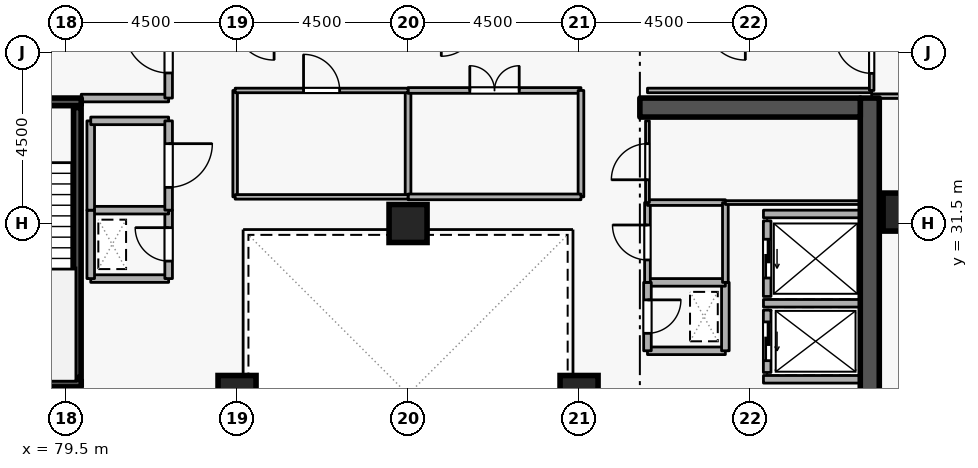
"""IFC4 building model, lengths in metres.
Left out: names, types, materials, properties, quantities, classifications, styles, units other than length and angle.
Written with IfcOpenShell. Run it as: python <this file> out.ifc"""

import sys

from ifc_helpers import new_model, si_unit, direction, frame, frame_2d, origin, origin_2d, place, context, subcontext, project, spatial, rectangle, extrude, element, fill, save


model = new_model("IFC4")
c1 = context("Model", 3, precision=1e-05, world=origin(), true_north=direction((0.0, 1.0)))
c2 = subcontext(c1, "Body", "Model", "MODEL_VIEW")
j1 = project(units=[si_unit("LENGTHUNIT", "METRE"), si_unit("PLANEANGLEUNIT", "RADIAN")], contexts=[c1])
p1 = place(None, origin())
s1 = spatial("IfcSite", under=j1, at=p1, CompositionType="ELEMENT")
p2 = place(p1, origin())
s2 = spatial("IfcBuilding", under=s1, at=p2, CompositionType="ELEMENT")
p3 = place(p2, frame((0.0, 0.0, 240.3)))
s3 = spatial("IfcBuildingStorey", under=s2, at=p3, CompositionType="ELEMENT", Elevation=240.3)
p4 = place(p3, frame((100.65, 19.2, 0.0), z_axis=(0.0, 0.0, 1.0), x_axis=(0.0, 1.0, 0.0)))
e1 = element("IfcWall", 1, at=p4, inside=s3, PredefinedType="SHEAR", context=c2, shape_type="SweptSolid", body=[
    extrude(rectangle(XDim=15.6, YDim=0.5, at=frame_2d((7.8, 0.0))), origin(), (0.0, 0.0, 1.0), 3.6),
])
p5 = place(p3, frame((94.6, 34.55, 0.0), z_axis=(0.0, 0.0, 1.0), x_axis=(1.0, 0.0, 0.0)))
e2 = element("IfcWall", 2, at=p5, inside=s3, PredefinedType="SHEAR", context=c2, shape_type="SweptSolid", body=[
    extrude(rectangle(XDim=5.8, YDim=0.5, at=frame_2d((2.9, 0.0))), origin(), (0.0, 0.0, 1.0), 3.6),
])
for number, where, z_axis, x_axis in (
    (3, (101.5, 31.8, 0.0), (0.0, 0.0, 1.0), (1.0, 0.0, 0.0)),
    (4, (93.0, 27.0, 0.0), (0.0, 0.0, 1.0), (1.0, 0.0, 0.0)),
    (5, (84.0, 27.0, 0.0), (0.0, 0.0, 1.0), (1.0, 0.0, 0.0)),
    (6, (88.5, 31.5, 0.0), (0.0, 0.0, 1.0), (1.0, 0.0, 0.0)),
):
    element("IfcColumn", number, at=place(p3, frame(where, z_axis=z_axis, x_axis=x_axis)), inside=s3, PredefinedType="COLUMN", context=c2, shape_type="SweptSolid", body=[
        extrude(rectangle(XDim=1.0, YDim=1.0, at=origin_2d()), origin(), (0.0, 0.0, 1.0), 3.6),
    ])
p6 = place(p3, frame((97.95, 29.22, 0.0), z_axis=(0.0, 0.0, 1.0), x_axis=(0.0, -1.0, 0.0)))
e7 = element("IfcWall", 7, at=p6, inside=s3, PredefinedType="STANDARD", context=c2, shape_type="SweptSolid", body=[
    extrude(rectangle(XDim=1.64, YDim=0.2, at=frame_2d((0.82, 0.0))), origin(), (0.0, 0.0, 1.0), 3.34),
])
p7 = place(p6, frame((0.31, 0.0, 0.0)))
e8 = element("IfcOpeningElement", 8, at=p7, cuts=e7, PredefinedType="OPENING", context=c2, shape_type="SweptSolid", body=[
    extrude(rectangle(XDim=1.02, YDim=2.06, at=frame_2d((0.51, 1.03))), frame((0.0, 0.11, 0.0), z_axis=(0.0, -1.0, 0.0), x_axis=(1.0, 0.0, 0.0)), (0.0, 0.0, 1.0), 0.22),
])
p8 = place(p3, frame((97.95, 31.57, 0.0), z_axis=(0.0, 0.0, 1.0), x_axis=(0.0, -1.0, 0.0)))
e9 = element("IfcWall", 9, at=p8, inside=s3, PredefinedType="STANDARD", context=c2, shape_type="SweptSolid", body=[
    extrude(rectangle(XDim=1.99, YDim=0.2, at=frame_2d((0.995, 0.0))), origin(), (0.0, 0.0, 1.0), 3.34),
])
p9 = place(p8, frame((0.485, 0.0, 0.0)))
e10 = element("IfcOpeningElement", 10, at=p9, cuts=e9, PredefinedType="OPENING", context=c2, shape_type="SweptSolid", body=[
    extrude(rectangle(XDim=1.02, YDim=2.06, at=frame_2d((0.51, 1.03))), frame((0.0, 0.11, 0.0), z_axis=(0.0, -1.0, 0.0), x_axis=(1.0, 0.0, 0.0)), (0.0, 0.0, 1.0), 0.22),
])
for number, where, z_axis, x_axis in (
    (11, (97.852, 29.4, 0.0), (0.0, 0.0, 1.0), (1.0, 0.0, 0.0)),
    (12, (97.852, 27.4, 0.0), (0.0, 0.0, 1.0), (1.0, 0.0, 0.0)),
    (13, (97.852, 31.75, 0.0), (0.0, 0.0, 1.0), (1.0, 0.0, 0.0)),
):
    element("IfcWall", number, at=place(p3, frame(where, z_axis=z_axis, x_axis=x_axis)), inside=s3, PredefinedType="STANDARD", context=c2, shape_type="SweptSolid", body=[
        extrude(rectangle(XDim=2.536, YDim=0.2, at=frame_2d((1.268, 0.0))), origin(), (0.0, 0.0, 1.0), 3.34),
    ])
p10 = place(p3, frame((76.55, 34.7, 0.0), z_axis=(0.0, 0.0, 1.0), x_axis=(1.0, 0.0, 0.0)))
e14 = element("IfcWall", 14, at=p10, inside=s3, PredefinedType="SHEAR", context=c2, shape_type="SweptSolid", body=[
    extrude(rectangle(XDim=3.35, YDim=0.2, at=frame_2d((1.675, 0.0))), origin(), (0.0, 0.0, 1.0), 3.6),
])
p11 = place(p10, frame((1.125, 0.0, 0.0)))
e15 = element("IfcOpeningElement", 15, at=p11, cuts=e14, PredefinedType="OPENING", context=c2, shape_type="SweptSolid", body=[
    extrude(rectangle(XDim=1.1, YDim=2.1, at=frame_2d((0.55, 1.05))), frame((0.0, 0.11, 0.0), z_axis=(0.0, -1.0, 0.0), x_axis=(1.0, 0.0, 0.0)), (0.0, 0.0, 1.0), 0.22),
])
p12 = place(p3, frame((79.9, 27.3, 0.0), z_axis=(0.0, 0.0, 1.0), x_axis=(-1.0, 0.0, 0.0)))
e16 = element("IfcWall", 16, at=p12, inside=s3, PredefinedType="SHEAR", context=c2, shape_type="SweptSolid", body=[
    extrude(rectangle(XDim=3.35, YDim=0.2, at=frame_2d((1.675, 0.0))), origin(), (0.0, 0.0, 1.0), 3.6),
])
p13 = place(p3, frame((79.797, 27.45, 0.0), z_axis=(0.0, 0.0, 1.0), x_axis=(0.0, 1.0, 0.0)))
e17 = element("IfcWall", 17, at=p13, inside=s3, PredefinedType="SHEAR", context=c2, shape_type="SweptSolid", body=[
    extrude(rectangle(XDim=7.1, YDim=0.2, at=frame_2d((3.55, 0.0))), origin(), (0.0, 0.0, 1.0), 3.6),
])
p14 = place(p3, frame((79.9, 34.8, 0.0), z_axis=(0.0, 0.0, 1.0), x_axis=(1.0, 0.0, 0.0)))
e18 = element("IfcWall", 18, at=p14, inside=s3, PredefinedType="STANDARD", context=c2, shape_type="SweptSolid", body=[
    extrude(rectangle(XDim=2.3, YDim=0.2, at=frame_2d((1.15, 0.0))), origin(), (0.0, 0.0, 1.0), 2.545),
])
p15 = place(p3, frame((82.2, 34.8, 0.0), z_axis=(0.0, 0.0, 1.0), x_axis=(0.0, 1.0, 0.0)))
e19 = element("IfcWall", 19, at=p15, inside=s3, PredefinedType="STANDARD", context=c2, shape_type="SweptSolid", body=[
    extrude(rectangle(XDim=2.5, YDim=0.2, at=frame_2d((1.25, 0.0))), origin(), (0.0, 0.0, 1.0), 3.34),
])
p16 = place(p15, frame((0.66, 0.0, 0.0)))
e20 = element("IfcOpeningElement", 20, at=p16, cuts=e19, PredefinedType="OPENING", context=c2, shape_type="SweptSolid", body=[
    extrude(rectangle(XDim=1.15, YDim=2.1, at=frame_2d((0.575, 1.05))), frame((0.0, 0.11, 0.0), z_axis=(0.0, -1.0, 0.0), x_axis=(1.0, 0.0, 0.0)), (0.0, 0.0, 1.0), 0.22),
])
p17 = place(p3, frame((94.8, 28.15, 0.0), z_axis=(0.0, 0.0, 1.0), x_axis=(1.0, 0.0, 0.0)))
e21 = element("IfcWall", 21, at=p17, inside=s3, PredefinedType="STANDARD", context=c2, shape_type="SweptSolid", body=[
    extrude(rectangle(XDim=2.05, YDim=0.2, at=frame_2d((1.025, 0.0))), origin(), (0.0, 0.0, 1.0), 3.34),
])
p18 = place(p3, frame((96.85, 28.15, 0.0), z_axis=(0.0, 0.0, 1.0), x_axis=(0.0, 1.0, 0.0)))
e22 = element("IfcWall", 22, at=p18, inside=s3, PredefinedType="STANDARD", context=c2, shape_type="SweptSolid", body=[
    extrude(rectangle(XDim=1.8, YDim=0.2, at=frame_2d((0.9, 0.0))), origin(), (0.0, 0.0, 1.0), 3.34),
])
p19 = place(p3, frame((96.85, 29.95, 0.0), z_axis=(0.0, 0.0, 1.0), x_axis=(-1.0, 0.0, 0.0)))
e23 = element("IfcWall", 23, at=p19, inside=s3, PredefinedType="STANDARD", context=c2, shape_type="SweptSolid", body=[
    extrude(rectangle(XDim=2.05, YDim=0.2, at=frame_2d((1.025, 0.0))), origin(), (0.0, 0.0, 1.0), 3.34),
])
p20 = place(p3, frame((94.8, 29.95, 0.0), z_axis=(0.0, 0.0, 1.0), x_axis=(0.0, -1.0, 0.0)))
e24 = element("IfcWall", 24, at=p20, inside=s3, PredefinedType="STANDARD", context=c2, shape_type="SweptSolid", body=[
    extrude(rectangle(XDim=1.8, YDim=0.2, at=frame_2d((0.9, 0.0))), origin(), (0.0, 0.0, 1.0), 3.34),
])
p21 = place(p20, frame((0.46, 0.0, 0.0)))
e25 = element("IfcOpeningElement", 25, at=p21, cuts=e24, PredefinedType="OPENING", context=c2, shape_type="SweptSolid", body=[
    extrude(rectangle(XDim=0.88, YDim=2.04, at=frame_2d((0.44, 1.02))), frame((0.0, 0.11, 0.0), z_axis=(0.0, -1.0, 0.0), x_axis=(1.0, 0.0, 0.0)), (0.0, 0.0, 1.0), 0.22),
])
p22 = place(p3, frame((80.15, 30.05, 0.0), z_axis=(0.0, 0.0, 1.0), x_axis=(1.0, 0.0, 0.0)))
e26 = element("IfcWall", 26, at=p22, inside=s3, PredefinedType="STANDARD", context=c2, shape_type="SweptSolid", body=[
    extrude(rectangle(XDim=2.05, YDim=0.2, at=frame_2d((1.025, 0.0))), origin(), (0.0, 0.0, 1.0), 3.34),
])
p23 = place(p3, frame((82.2, 30.05, 0.0), z_axis=(0.0, 0.0, 1.0), x_axis=(0.0, 1.0, 0.0)))
e27 = element("IfcWall", 27, at=p23, inside=s3, PredefinedType="STANDARD", context=c2, shape_type="SweptSolid", body=[
    extrude(rectangle(XDim=1.8, YDim=0.2, at=frame_2d((0.9, 0.0))), origin(), (0.0, 0.0, 1.0), 3.34),
])
p24 = place(p23, frame((0.46, 0.0, 0.0)))
e28 = element("IfcOpeningElement", 28, at=p24, cuts=e27, PredefinedType="OPENING", context=c2, shape_type="SweptSolid", body=[
    extrude(rectangle(XDim=0.88, YDim=2.04, at=frame_2d((0.44, 1.02))), frame((0.0, 0.11, 0.0), z_axis=(0.0, -1.0, 0.0), x_axis=(1.0, 0.0, 0.0)), (0.0, 0.0, 1.0), 0.22),
])
p25 = place(p3, frame((82.2, 31.85, 0.0), z_axis=(0.0, 0.0, 1.0), x_axis=(-1.0, 0.0, 0.0)))
e29 = element("IfcWall", 29, at=p25, inside=s3, PredefinedType="STANDARD", context=c2, shape_type="SweptSolid", body=[
    extrude(rectangle(XDim=2.05, YDim=0.2, at=frame_2d((1.025, 0.0))), origin(), (0.0, 0.0, 1.0), 3.34),
])
p26 = place(p3, frame((80.15, 31.85, 0.0), z_axis=(0.0, 0.0, 1.0), x_axis=(0.0, -1.0, 0.0)))
e30 = element("IfcWall", 30, at=p26, inside=s3, PredefinedType="STANDARD", context=c2, shape_type="SweptSolid", body=[
    extrude(rectangle(XDim=1.8, YDim=0.2, at=frame_2d((0.9, 0.0))), origin(), (0.0, 0.0, 1.0), 3.34),
])
p27 = place(p3, frame((80.15, 31.85, 0.0), z_axis=(0.0, 0.0, 1.0), x_axis=(0.0, 1.0, 0.0)))
e31 = element("IfcWall", 31, at=p27, inside=s3, PredefinedType="STANDARD", context=c2, shape_type="SweptSolid", body=[
    extrude(rectangle(XDim=2.35, YDim=0.2, at=frame_2d((1.175, 0.0))), origin(), (0.0, 0.0, 1.0), 3.34),
])
p28 = place(p3, frame((80.15, 34.2, 0.0), z_axis=(0.0, 0.0, 1.0), x_axis=(1.0, 0.0, 0.0)))
e32 = element("IfcWall", 32, at=p28, inside=s3, PredefinedType="STANDARD", context=c2, shape_type="SweptSolid", body=[
    extrude(rectangle(XDim=2.05, YDim=0.2, at=frame_2d((1.025, 0.0))), origin(), (0.0, 0.0, 1.0), 2.545),
])
p29 = place(p3, frame((82.2, 34.2, 0.0), z_axis=(0.0, 0.0, 1.0), x_axis=(0.0, -1.0, 0.0)))
e33 = element("IfcWall", 33, at=p29, inside=s3, PredefinedType="STANDARD", context=c2, shape_type="SweptSolid", body=[
    extrude(rectangle(XDim=2.35, YDim=0.2, at=frame_2d((1.175, 0.0))), origin(), (0.0, 0.0, 1.0), 3.34),
])
p30 = place(p29, frame((0.6, 0.0, 0.0)))
e34 = element("IfcOpeningElement", 34, at=p30, cuts=e33, PredefinedType="OPENING", context=c2, shape_type="SweptSolid", body=[
    extrude(rectangle(XDim=1.15, YDim=2.1, at=frame_2d((0.575, 1.05))), frame((0.0, 0.11, 0.0), z_axis=(0.0, -1.0, 0.0), x_axis=(1.0, 0.0, 0.0)), (0.0, 0.0, 1.0), 0.22),
])
p31 = place(p3, frame((94.8, 29.95, 0.0), z_axis=(0.0, 0.0, 1.0), x_axis=(0.0, 1.0, 0.0)))
e35 = element("IfcWall", 35, at=p31, inside=s3, PredefinedType="PARTITIONING", context=c2, shape_type="SweptSolid", body=[
    extrude(rectangle(XDim=2.1, YDim=0.15, at=frame_2d((1.05, 0.0))), origin(), (0.0, 0.0, 1.0), 3.34),
])
p32 = place(p31, frame((0.59, 0.0, 0.0)))
e36 = element("IfcOpeningElement", 36, at=p32, cuts=e35, PredefinedType="OPENING", context=c2, shape_type="SweptSolid", body=[
    extrude(rectangle(XDim=0.92, YDim=2.08, at=frame_2d((0.46, 1.04))), frame((0.0, 0.085, 0.0), z_axis=(0.0, -1.0, 0.0), x_axis=(1.0, 0.0, 0.0)), (0.0, 0.0, 1.0), 0.17),
])
p33 = place(p3, frame((94.8, 32.05, 0.0), z_axis=(0.0, 0.0, 1.0), x_axis=(1.0, 0.0, 0.0)))
e37 = element("IfcWall", 37, at=p33, inside=s3, PredefinedType="PARTITIONING", context=c2, shape_type="SweptSolid", body=[
    extrude(rectangle(XDim=2.05, YDim=0.15, at=frame_2d((1.025, 0.0))), origin(), (0.0, 0.0, 1.0), 3.34),
])
p34 = place(p3, frame((96.85, 32.05, 0.0), z_axis=(0.0, 0.0, 1.0), x_axis=(0.0, -1.0, 0.0)))
e38 = element("IfcWall", 38, at=p34, inside=s3, PredefinedType="PARTITIONING", context=c2, shape_type="SweptSolid", body=[
    extrude(rectangle(XDim=2.1, YDim=0.15, at=frame_2d((1.05, 0.0))), origin(), (0.0, 0.0, 1.0), 3.34),
])
p35 = place(p3, frame((94.8, 32.05, 0.0), z_axis=(0.0, 0.0, 1.0), x_axis=(0.0, 1.0, 0.0)))
e39 = element("IfcWall", 39, at=p35, inside=s3, PredefinedType="PARTITIONING", context=c2, shape_type="SweptSolid", body=[
    extrude(rectangle(XDim=2.15, YDim=0.1, at=frame_2d((1.075, 0.0))), origin(), (0.0, 0.0, 1.0), 3.34),
])
p36 = place(p35, frame((0.6, 0.0, 0.0)))
e40 = element("IfcOpeningElement", 40, at=p36, cuts=e39, PredefinedType="OPENING", context=c2, shape_type="SweptSolid", body=[
    extrude(rectangle(XDim=0.95, YDim=2.1, at=frame_2d((0.475, 1.05))), frame((0.0, 0.06, 0.0), z_axis=(0.0, -1.0, 0.0), x_axis=(1.0, 0.0, 0.0)), (0.0, 0.0, 1.0), 0.12),
])
p37 = place(p3, frame((100.4, 32.05, 0.0), z_axis=(0.0, 0.0, 1.0), x_axis=(-1.0, 0.0, 0.0)))
e41 = element("IfcWall", 41, at=p37, inside=s3, PredefinedType="PARTITIONING", context=c2, shape_type="SweptSolid", body=[
    extrude(rectangle(XDim=3.55, YDim=0.1, at=frame_2d((1.775, 0.0))), origin(), (0.0, 0.0, 1.0), 3.34),
])
p38 = place(p3, frame((94.8, 35.0, 0.0), z_axis=(0.0, 0.0, 1.0), x_axis=(1.0, 0.0, 0.0)))
e42 = element("IfcWall", 42, at=p38, inside=s3, PredefinedType="PARTITIONING", context=c2, shape_type="SweptSolid", body=[
    extrude(rectangle(XDim=5.9, YDim=0.12, at=frame_2d((2.95, 0.0))), origin(), (0.0, 0.0, 1.0), 3.34),
])
p39 = place(p3, frame((100.7, 35.0, 0.0), z_axis=(0.0, 0.0, 1.0), x_axis=(0.0, 1.0, 0.0)))
e43 = element("IfcWall", 43, at=p39, inside=s3, PredefinedType="PARTITIONING", context=c2, shape_type="SweptSolid", body=[
    extrude(rectangle(XDim=1.85, YDim=0.12, at=frame_2d((0.925, 0.0))), origin(), (0.0, 0.0, 1.0), 3.34),
])
p40 = place(p39, frame((0.45, 0.0, 0.0)))
e44 = element("IfcOpeningElement", 44, at=p40, cuts=e43, PredefinedType="OPENING", context=c2, shape_type="SweptSolid", body=[
    extrude(rectangle(XDim=0.95, YDim=2.1, at=frame_2d((0.475, 1.05))), frame((0.0, 0.07, 0.0), z_axis=(0.0, -1.0, 0.0), x_axis=(1.0, 0.0, 0.0)), (0.0, 0.0, 1.0), 0.14),
])
p41 = place(p3, frame((112.22, 34.85, 0.0), z_axis=(0.0, 0.0, 1.0), x_axis=(-1.0, 0.0, 0.0)))
e45 = element("IfcWall", 45, at=p41, inside=s3, PredefinedType="PARTITIONING", context=c2, shape_type="SweptSolid", body=[
    extrude(rectangle(XDim=11.52, YDim=0.12, at=frame_2d((5.76, 0.0))), origin(), (0.0, 0.0, 1.0), 3.34),
])
p42 = place(p3, frame((88.5, 32.2, 0.0), z_axis=(0.0, 0.0, 1.0), x_axis=(0.0, 1.0, 0.0)))
e46 = element("IfcWall", 46, at=p42, inside=s3, PredefinedType="PARTITIONING", context=c2, shape_type="SweptSolid", body=[
    extrude(rectangle(XDim=2.8, YDim=0.15, at=frame_2d((1.4, 0.0))), origin(), (0.0, 0.0, 1.0), 2.878),
])
p43 = place(p3, frame((88.5, 35.0, 0.0), z_axis=(0.0, 0.0, 1.0), x_axis=(1.0, 0.0, 0.0)))
e47 = element("IfcWall", 47, at=p43, inside=s3, PredefinedType="PARTITIONING", context=c2, shape_type="SweptSolid", body=[
    extrude(rectangle(XDim=4.55, YDim=0.15, at=frame_2d((2.275, 0.0))), origin(), (0.0, 0.0, 1.0), 3.34),
])
p44 = place(p43, frame((1.625, 0.0, 0.0)))
e48 = element("IfcOpeningElement", 48, at=p44, cuts=e47, PredefinedType="OPENING", context=c2, shape_type="SweptSolid", body=[
    extrude(rectangle(XDim=1.3, YDim=2.12, at=frame_2d((0.65, 1.06))), frame((0.0, 0.085, 0.0), z_axis=(0.0, -1.0, 0.0), x_axis=(1.0, 0.0, 0.0)), (0.0, 0.0, 1.0), 0.17),
])
p45 = place(p3, frame((93.05, 35.0, 0.0), z_axis=(0.0, 0.0, 1.0), x_axis=(0.0, -1.0, 0.0)))
e49 = element("IfcWall", 49, at=p45, inside=s3, PredefinedType="PARTITIONING", context=c2, shape_type="SweptSolid", body=[
    extrude(rectangle(XDim=2.8, YDim=0.15, at=frame_2d((1.4, 0.0))), origin(), (0.0, 0.0, 1.0), 3.34),
])
p46 = place(p3, frame((93.05, 32.2, 0.0), z_axis=(0.0, 0.0, 1.0), x_axis=(-1.0, 0.0, 0.0)))
e50 = element("IfcWall", 50, at=p46, inside=s3, PredefinedType="PARTITIONING", context=c2, shape_type="SweptSolid", body=[
    extrude(rectangle(XDim=4.55, YDim=0.15, at=frame_2d((2.275, 0.0))), origin(), (0.0, 0.0, 1.0), 3.34),
])
p47 = place(p3, frame((83.95, 32.2, 0.0), z_axis=(0.0, 0.0, 1.0), x_axis=(0.0, 1.0, 0.0)))
e51 = element("IfcWall", 51, at=p47, inside=s3, PredefinedType="PARTITIONING", context=c2, shape_type="SweptSolid", body=[
    extrude(rectangle(XDim=2.8, YDim=0.12, at=frame_2d((1.4, 0.0))), origin(), (0.0, 0.0, 1.0), 3.34),
])
p48 = place(p3, frame((83.95, 35.0, 0.0), z_axis=(0.0, 0.0, 1.0), x_axis=(1.0, 0.0, 0.0)))
e52 = element("IfcWall", 52, at=p48, inside=s3, PredefinedType="PARTITIONING", context=c2, shape_type="SweptSolid", body=[
    extrude(rectangle(XDim=4.55, YDim=0.12, at=frame_2d((2.275, 0.0))), origin(), (0.0, 0.0, 1.0), 3.34),
])
p49 = place(p48, frame((1.8, 0.0, 0.0)))
e53 = element("IfcOpeningElement", 53, at=p49, cuts=e52, PredefinedType="OPENING", context=c2, shape_type="SweptSolid", body=[
    extrude(rectangle(XDim=0.95, YDim=2.1, at=frame_2d((0.475, 1.05))), frame((0.0, 0.07, 0.0), z_axis=(0.0, -1.0, 0.0), x_axis=(1.0, 0.0, 0.0)), (0.0, 0.0, 1.0), 0.14),
])
p50 = place(p3, frame((88.5, 32.2, 0.0), z_axis=(0.0, 0.0, 1.0), x_axis=(-1.0, 0.0, 0.0)))
e54 = element("IfcWall", 54, at=p50, inside=s3, PredefinedType="PARTITIONING", context=c2, shape_type="SweptSolid", body=[
    extrude(rectangle(XDim=4.55, YDim=0.12, at=frame_2d((2.275, 0.0))), origin(), (0.0, 0.0, 1.0), 3.34),
])
p51 = place(p7, origin())
e55 = element("IfcDoor", 55, at=p51, inside=s3, OperationType="SLIDING_TO_LEFT", PredefinedType="DOOR", context=c2, shape_type="SweptSolid", body=[
    extrude(rectangle(XDim=1.02, YDim=2.06, at=frame_2d((0.51, 1.03))), frame((0.0, 0.025, 0.0), z_axis=(0.0, -1.0, 0.0), x_axis=(1.0, 0.0, 0.0)), (0.0, 0.0, 1.0), 0.05),
])
fill(e8, e55)
p52 = place(p9, origin())
e56 = element("IfcDoor", 56, at=p52, inside=s3, OperationType="SLIDING_TO_LEFT", PredefinedType="DOOR", context=c2, shape_type="SweptSolid", body=[
    extrude(rectangle(XDim=1.02, YDim=2.06, at=frame_2d((0.51, 1.03))), frame((0.0, 0.025, 0.0), z_axis=(0.0, -1.0, 0.0), x_axis=(1.0, 0.0, 0.0)), (0.0, 0.0, 1.0), 0.05),
])
fill(e10, e56)
p53 = place(p16, origin())
e57 = element("IfcDoor", 57, at=p53, inside=s3, OperationType="SINGLE_SWING_RIGHT", PredefinedType="DOOR", context=c2, shape_type="SweptSolid", body=[
    extrude(rectangle(XDim=1.15, YDim=2.1, at=frame_2d((0.575, 1.05))), frame((0.0, 0.025, 0.0), z_axis=(0.0, -1.0, 0.0), x_axis=(1.0, 0.0, 0.0)), (0.0, 0.0, 1.0), 0.05),
])
fill(e20, e57)
p54 = place(p21, origin())
e58 = element("IfcDoor", 58, at=p54, inside=s3, OperationType="SINGLE_SWING_LEFT", PredefinedType="DOOR", context=c2, shape_type="SweptSolid", body=[
    extrude(rectangle(XDim=0.88, YDim=2.04, at=frame_2d((0.44, 1.02))), frame((0.0, 0.025, 0.0), z_axis=(0.0, -1.0, 0.0), x_axis=(1.0, 0.0, 0.0)), (0.0, 0.0, 1.0), 0.05),
])
fill(e25, e58)
p55 = place(p24, origin())
e59 = element("IfcDoor", 59, at=p55, inside=s3, OperationType="SINGLE_SWING_RIGHT", PredefinedType="DOOR", context=c2, shape_type="SweptSolid", body=[
    extrude(rectangle(XDim=0.88, YDim=2.04, at=frame_2d((0.44, 1.02))), frame((0.0, 0.025, 0.0), z_axis=(0.0, -1.0, 0.0), x_axis=(1.0, 0.0, 0.0)), (0.0, 0.0, 1.0), 0.05),
])
fill(e28, e59)
p56 = place(p32, origin())
e60 = element("IfcDoor", 60, at=p56, inside=s3, OperationType="SINGLE_SWING_RIGHT", PredefinedType="DOOR", context=c2, shape_type="SweptSolid", body=[
    extrude(rectangle(XDim=0.92, YDim=2.08, at=frame_2d((0.46, 1.04))), frame((0.0, 0.025, 0.0), z_axis=(0.0, -1.0, 0.0), x_axis=(1.0, 0.0, 0.0)), (0.0, 0.0, 1.0), 0.05),
])
fill(e36, e60)
p57 = place(p36, origin())
e61 = element("IfcDoor", 61, at=p57, inside=s3, OperationType="SINGLE_SWING_LEFT", PredefinedType="DOOR", context=c2, shape_type="SweptSolid", body=[
    extrude(rectangle(XDim=0.95, YDim=2.1, at=frame_2d((0.475, 1.05))), frame((0.0, 0.025, 0.0), z_axis=(0.0, -1.0, 0.0), x_axis=(1.0, 0.0, 0.0)), (0.0, 0.0, 1.0), 0.05),
])
fill(e40, e61)
p58 = place(p30, origin())
e62 = element("IfcDoor", 62, at=p58, inside=s3, OperationType="SINGLE_SWING_LEFT", PredefinedType="DOOR", context=c2, shape_type="SweptSolid", body=[
    extrude(rectangle(XDim=1.15, YDim=2.1, at=frame_2d((0.575, 1.05))), frame((0.0, 0.025, 0.0), z_axis=(0.0, -1.0, 0.0), x_axis=(1.0, 0.0, 0.0)), (0.0, 0.0, 1.0), 0.05),
])
fill(e34, e62)
p59 = place(p40, origin())
e63 = element("IfcDoor", 63, at=p59, inside=s3, OperationType="SINGLE_SWING_RIGHT", PredefinedType="DOOR", context=c2, shape_type="SweptSolid", body=[
    extrude(rectangle(XDim=0.95, YDim=2.1, at=frame_2d((0.475, 1.05))), frame((0.0, 0.025, 0.0), z_axis=(0.0, -1.0, 0.0), x_axis=(1.0, 0.0, 0.0)), (0.0, 0.0, 1.0), 0.05),
])
fill(e44, e63)
p60 = place(p44, origin())
e64 = element("IfcDoor", 64, at=p60, inside=s3, OperationType="DOUBLE_DOOR_SINGLE_SWING", PredefinedType="DOOR", context=c2, shape_type="SweptSolid", body=[
    extrude(rectangle(XDim=1.3, YDim=2.12, at=frame_2d((0.65, 1.06))), frame((0.0, 0.025, 0.0), z_axis=(0.0, -1.0, 0.0), x_axis=(1.0, 0.0, 0.0)), (0.0, 0.0, 1.0), 0.05),
])
fill(e48, e64)
p61 = place(p49, origin())
e65 = element("IfcDoor", 65, at=p61, inside=s3, OperationType="SINGLE_SWING_LEFT", PredefinedType="DOOR", context=c2, shape_type="SweptSolid", body=[
    extrude(rectangle(XDim=0.95, YDim=2.1, at=frame_2d((0.475, 1.05))), frame((0.0, 0.025, 0.0), z_axis=(0.0, -1.0, 0.0), x_axis=(1.0, 0.0, 0.0)), (0.0, 0.0, 1.0), 0.05),
])
fill(e53, e65)
save(model, sys.argv[1])
